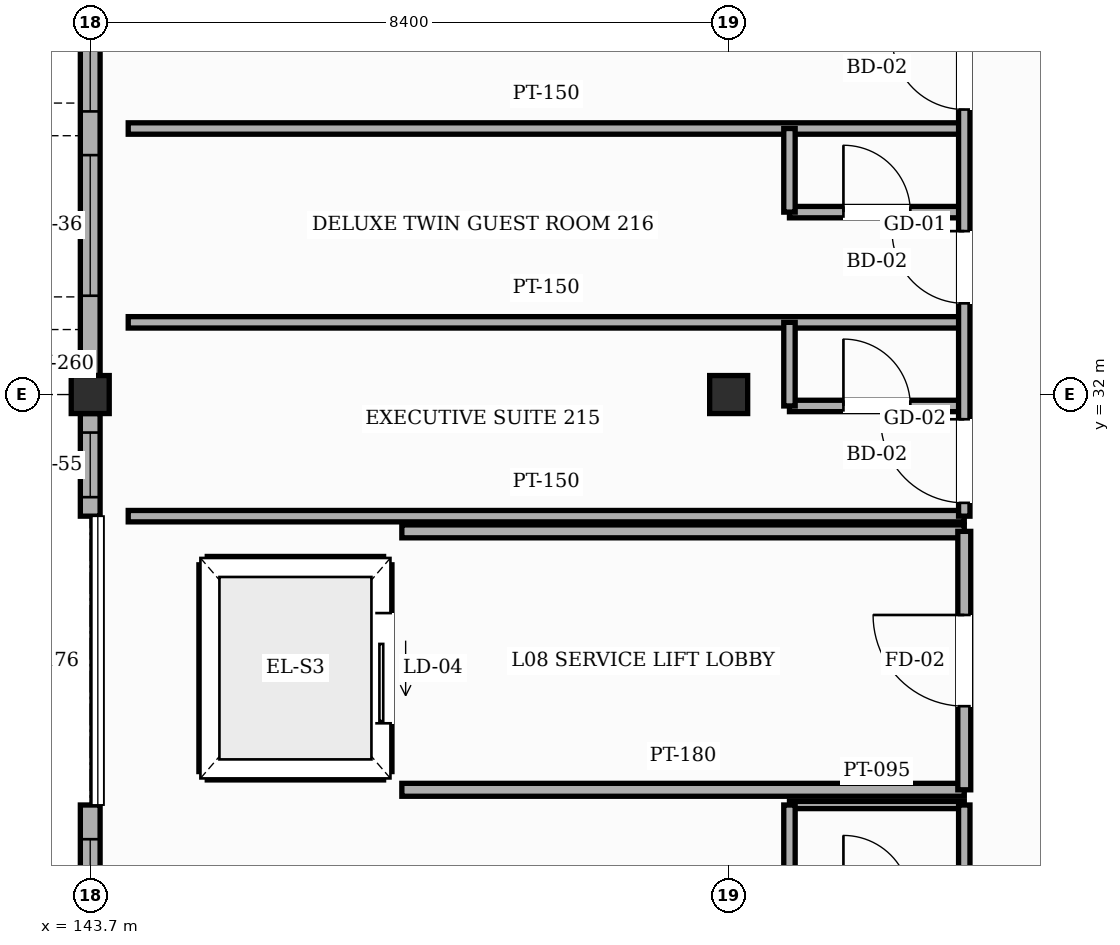
"""IFC4 building model, lengths in metres.
Left out: names, types, materials, properties, quantities, classifications, styles, units other than length and angle.
Written with IfcOpenShell. Run it as: python <this file> out.ifc"""

import sys

from ifc_helpers import new_model, si_unit, direction, frame, frame_2d, origin, origin_2d, place, context, subcontext, project, spatial, rectangle, hollow_rectangle, extrude, element, fill, save


model = new_model("IFC4")
c1 = context("Model", 3, precision=1e-05, world=origin(), true_north=direction((0.0, 1.0)))
c2 = subcontext(c1, "Body", "Model", "MODEL_VIEW")
j1 = project(units=[si_unit("LENGTHUNIT", "METRE"), si_unit("PLANEANGLEUNIT", "RADIAN")], contexts=[c1])
p1 = place(None, origin())
s1 = spatial("IfcSite", under=j1, at=p1, CompositionType="ELEMENT")
p2 = place(p1, origin())
s2 = spatial("IfcBuilding", under=s1, at=p2, CompositionType="ELEMENT")
p3 = place(p2, frame((0.0, 0.0, 35.4)))
s3 = spatial("IfcBuildingStorey", under=s2, at=p3, CompositionType="ELEMENT", Elevation=35.4)
for number, where, z_axis, x_axis in (
    (1, (143.7, 32.0, 0.0), (0.0, 0.0, 1.0), (1.0, 0.0, 0.0)),
    (2, (152.1, 32.0, 0.0), (0.0, 0.0, 1.0), (1.0, 0.0, 0.0)),
):
    element("IfcColumn", number, at=place(p3, frame(where, z_axis=z_axis, x_axis=x_axis)), inside=s3, PredefinedType="COLUMN", context=c2, shape_type="SweptSolid", body=[
        extrude(hollow_rectangle(XDim=0.5, YDim=0.5, WallThickness=0.022, InnerFilletRadius=0.022, OuterFilletRadius=0.044, at=origin_2d()), origin(), (0.0, 0.0, 1.0), 3.6),
    ])
p4 = place(p3, frame((143.7, 24.25, 0.0), z_axis=(0.0, 0.0, 1.0), x_axis=(0.0, 1.0, 0.0)))
e3 = element("IfcWall", 3, at=p4, inside=s3, PredefinedType="SOLIDWALL", context=c2, shape_type="SweptSolid", body=[
    extrude(rectangle(XDim=2.35, YDim=0.26, at=frame_2d((1.175, 0.0))), origin(), (0.0, 0.0, 1.0), 2.805),
])
p5 = place(p4, frame((0.45, 0.0, 0.85)))
e4 = element("IfcOpeningElement", 4, at=p5, cuts=e3, PredefinedType="OPENING", context=c2, shape_type="SweptSolid", body=[
    extrude(rectangle(XDim=1.45, YDim=1.35, at=frame_2d((0.725, 0.675))), frame((0.0, 0.14, 0.0), z_axis=(0.0, -1.0, 0.0), x_axis=(1.0, 0.0, 0.0)), (0.0, 0.0, 1.0), 0.28),
])
p6 = place(p3, frame((143.7, 30.4, 0.0), z_axis=(0.0, 0.0, 1.0), x_axis=(0.0, 1.0, 0.0)))
e5 = element("IfcWall", 5, at=p6, inside=s3, PredefinedType="SOLIDWALL", context=c2, shape_type="SweptSolid", body=[
    extrude(rectangle(XDim=1.35, YDim=0.26, at=frame_2d((0.675, 0.0))), origin(), (0.0, 0.0, 1.0), 2.805),
])
p7 = place(p6, frame((0.25, 0.0, 0.85)))
e6 = element("IfcOpeningElement", 6, at=p7, cuts=e5, PredefinedType="OPENING", context=c2, shape_type="SweptSolid", body=[
    extrude(rectangle(XDim=0.85, YDim=1.35, at=frame_2d((0.425, 0.675))), frame((0.0, 0.14, 0.0), z_axis=(0.0, -1.0, 0.0), x_axis=(1.0, 0.0, 0.0)), (0.0, 0.0, 1.0), 0.28),
])
p8 = place(p3, frame((143.7, 32.25, 0.0), z_axis=(0.0, 0.0, 1.0), x_axis=(0.0, 1.0, 0.0)))
e7 = element("IfcWall", 7, at=p8, inside=s3, PredefinedType="SOLIDWALL", context=c2, shape_type="SweptSolid", body=[
    extrude(rectangle(XDim=8.4, YDim=0.26, at=frame_2d((4.2, 0.0))), origin(), (0.0, 0.0, 1.0), 2.655),
])
p9 = place(p8, frame((1.05, 0.0, 0.85)))
e8 = element("IfcOpeningElement", 8, at=p9, cuts=e7, PredefinedType="OPENING", context=c2, shape_type="SweptSolid", body=[
    extrude(rectangle(XDim=1.85, YDim=1.35, at=frame_2d((0.925, 0.675))), frame((0.0, 0.14, 0.0), z_axis=(0.0, -1.0, 0.0), x_axis=(1.0, 0.0, 0.0)), (0.0, 0.0, 1.0), 0.28),
])
p10 = place(p8, frame((3.475, 0.0, 0.85)))
e9 = element("IfcOpeningElement", 9, at=p10, cuts=e7, PredefinedType="OPENING", context=c2, shape_type="SweptSolid", body=[
    extrude(rectangle(XDim=2.1, YDim=1.35, at=frame_2d((1.05, 0.675))), frame((0.0, 0.14, 0.0), z_axis=(0.0, -1.0, 0.0), x_axis=(1.0, 0.0, 0.0)), (0.0, 0.0, 1.0), 0.28),
])
p11 = place(p8, frame((6.5, 0.0, 0.85)))
e10 = element("IfcOpeningElement", 10, at=p11, cuts=e7, PredefinedType="OPENING", context=c2, shape_type="SweptSolid", body=[
    extrude(rectangle(XDim=1.15, YDim=1.35, at=frame_2d((0.575, 0.675))), frame((0.0, 0.14, 0.0), z_axis=(0.0, -1.0, 0.0), x_axis=(1.0, 0.0, 0.0)), (0.0, 0.0, 1.0), 0.28),
])
for number, where, z_axis, x_axis in (
    (11, (145.24, 29.76, 0.0), (0.0, 0.0, 1.0), (1.0, 0.0, 0.0)),
    (12, (145.24, 27.04, 0.0), (0.0, 0.0, 1.0), (1.0, 0.0, 0.0)),
):
    element("IfcWall", number, at=place(p3, frame(where, z_axis=z_axis, x_axis=x_axis)), inside=s3, PredefinedType="SHEAR", context=c2, shape_type="SweptSolid", body=[
        extrude(rectangle(XDim=2.32, YDim=0.22, at=frame_2d((1.16, 0.0))), origin(), (0.0, 0.0, 1.0), 3.38),
    ])
p12 = place(p3, frame((147.56, 27.04, 0.0), z_axis=(0.0, 0.0, 1.0), x_axis=(0.0, 1.0, 0.0)))
e13 = element("IfcWall", 13, at=p12, inside=s3, PredefinedType="SHEAR", context=c2, shape_type="SweptSolid", body=[
    extrude(rectangle(XDim=2.72, YDim=0.22, at=frame_2d((1.36, 0.0))), origin(), (0.0, 0.0, 1.0), 3.38),
])
p13 = place(p12, frame((0.635, 0.0, 0.0)))
e14 = element("IfcOpeningElement", 14, at=p13, cuts=e13, PredefinedType="OPENING", context=c2, shape_type="SweptSolid", body=[
    extrude(rectangle(XDim=1.45, YDim=2.35, at=frame_2d((0.725, 1.175))), frame((0.0, 0.12, 0.0), z_axis=(0.0, -1.0, 0.0), x_axis=(1.0, 0.0, 0.0)), (0.0, 0.0, 1.0), 0.24),
])
p14 = place(p3, frame((145.24, 27.04, 0.0), z_axis=(0.0, 0.0, 1.0), x_axis=(0.0, 1.0, 0.0)))
e15 = element("IfcWall", 15, at=p14, inside=s3, PredefinedType="SHEAR", context=c2, shape_type="SweptSolid", body=[
    extrude(rectangle(XDim=2.72, YDim=0.22, at=frame_2d((1.36, 0.0))), origin(), (0.0, 0.0, 1.0), 3.38),
])
p15 = place(p3, frame((152.9, 26.6, 0.0), z_axis=(0.0, 0.0, 1.0), x_axis=(1.0, 0.0, 0.0)))
e16 = element("IfcWall", 16, at=p15, inside=s3, PredefinedType="PARTITIONING", context=c2, shape_type="SweptSolid", body=[
    extrude(rectangle(XDim=2.3, YDim=0.095, at=frame_2d((1.15, 0.0))), origin(), (0.0, 0.0, 1.0), 3.365),
])
for number, where, z_axis, x_axis in (
    (17, (147.8, 26.8, 0.0), (0.0, 0.0, 1.0), (1.0, 0.0, 0.0)),
    (18, (147.8, 30.2, 0.0), (0.0, 0.0, 1.0), (1.0, 0.0, 0.0)),
):
    element("IfcWall", number, at=place(p3, frame(where, z_axis=z_axis, x_axis=x_axis)), inside=s3, PredefinedType="PARTITIONING", context=c2, shape_type="SweptSolid", body=[
        extrude(rectangle(XDim=7.4, YDim=0.17, at=frame_2d((3.7, 0.0))), origin(), (0.0, 0.0, 1.0), 3.365),
    ])
p16 = place(p3, frame((144.2, 30.4, 0.0), z_axis=(0.0, 0.0, 1.0), x_axis=(1.0, 0.0, 0.0)))
e19 = element("IfcWall", 19, at=p16, inside=s3, PredefinedType="PARTITIONING", context=c2, shape_type="SweptSolid", body=[
    extrude(rectangle(XDim=11.0, YDim=0.15, at=frame_2d((5.5, 0.0))), origin(), (0.0, 0.0, 1.0), 3.365),
])
p17 = place(p3, frame((152.9, 31.85, 0.0), z_axis=(0.0, 0.0, 1.0), x_axis=(1.0, 0.0, 0.0)))
e20 = element("IfcWall", 20, at=p17, inside=s3, PredefinedType="PARTITIONING", context=c2, shape_type="SweptSolid", body=[
    extrude(rectangle(XDim=2.3, YDim=0.15, at=frame_2d((1.15, 0.0))), origin(), (0.0, 0.0, 1.0), 2.755),
])
p18 = place(p17, frame((0.71, 0.0, 0.0)))
e21 = element("IfcOpeningElement", 21, at=p18, cuts=e20, PredefinedType="OPENING", context=c2, shape_type="SweptSolid", body=[
    extrude(rectangle(XDim=0.88, YDim=2.12, at=frame_2d((0.44, 1.06))), frame((0.0, 0.085, 0.0), z_axis=(0.0, -1.0, 0.0), x_axis=(1.0, 0.0, 0.0)), (0.0, 0.0, 1.0), 0.17),
])
p19 = place(p3, frame((144.2, 32.95, 0.0), z_axis=(0.0, 0.0, 1.0), x_axis=(1.0, 0.0, 0.0)))
e22 = element("IfcWall", 22, at=p19, inside=s3, PredefinedType="PARTITIONING", context=c2, shape_type="SweptSolid", body=[
    extrude(rectangle(XDim=11.0, YDim=0.15, at=frame_2d((5.5, 0.0))), origin(), (0.0, 0.0, 1.0), 3.365),
])
p20 = place(p3, frame((152.9, 34.4, 0.0), z_axis=(0.0, 0.0, 1.0), x_axis=(1.0, 0.0, 0.0)))
e23 = element("IfcWall", 23, at=p20, inside=s3, PredefinedType="PARTITIONING", context=c2, shape_type="SweptSolid", body=[
    extrude(rectangle(XDim=2.3, YDim=0.15, at=frame_2d((1.15, 0.0))), origin(), (0.0, 0.0, 1.0), 3.365),
])
p21 = place(p20, frame((0.71, 0.0, 0.0)))
e24 = element("IfcOpeningElement", 24, at=p21, cuts=e23, PredefinedType="OPENING", context=c2, shape_type="SweptSolid", body=[
    extrude(rectangle(XDim=0.88, YDim=2.12, at=frame_2d((0.44, 1.06))), frame((0.0, 0.085, 0.0), z_axis=(0.0, -1.0, 0.0), x_axis=(1.0, 0.0, 0.0)), (0.0, 0.0, 1.0), 0.17),
])
p22 = place(p3, frame((144.2, 35.5, 0.0), z_axis=(0.0, 0.0, 1.0), x_axis=(1.0, 0.0, 0.0)))
e25 = element("IfcWall", 25, at=p22, inside=s3, PredefinedType="PARTITIONING", context=c2, shape_type="SweptSolid", body=[
    extrude(rectangle(XDim=11.0, YDim=0.15, at=frame_2d((5.5, 0.0))), origin(), (0.0, 0.0, 1.0), 3.365),
])
p23 = place(p3, frame((152.9, 25.315, 0.0), z_axis=(0.0, 0.0, 1.0), x_axis=(0.0, 1.0, 0.0)))
e26 = element("IfcWall", 26, at=p23, inside=s3, PredefinedType="PARTITIONING", context=c2, shape_type="SweptSolid", body=[
    extrude(rectangle(XDim=1.285, YDim=0.15, at=frame_2d((0.643, 0.0))), origin(), (0.0, 0.0, 1.0), 3.365),
])
p24 = place(p3, frame((152.9, 31.85, 0.0), z_axis=(0.0, 0.0, 1.0), x_axis=(0.0, 1.0, 0.0)))
e27 = element("IfcWall", 27, at=p24, inside=s3, PredefinedType="PARTITIONING", context=c2, shape_type="SweptSolid", body=[
    extrude(rectangle(XDim=1.1, YDim=0.15, at=frame_2d((0.55, 0.0))), origin(), (0.0, 0.0, 1.0), 3.365),
])
p25 = place(p3, frame((152.9, 34.4, 0.0), z_axis=(0.0, 0.0, 1.0), x_axis=(0.0, 1.0, 0.0)))
e28 = element("IfcWall", 28, at=p25, inside=s3, PredefinedType="PARTITIONING", context=c2, shape_type="SweptSolid", body=[
    extrude(rectangle(XDim=1.1, YDim=0.15, at=frame_2d((0.55, 0.0))), origin(), (0.0, 0.0, 1.0), 3.365),
])
p26 = place(p3, frame((155.2, 8.4, 0.0), z_axis=(0.0, 0.0, 1.0), x_axis=(0.0, 1.0, 0.0)))
e29 = element("IfcWall", 29, at=p26, inside=s3, PredefinedType="PARTITIONING", context=c2, shape_type="SweptSolid", body=[
    extrude(rectangle(XDim=18.2, YDim=0.15, at=frame_2d((9.1, 0.0))), origin(), (0.0, 0.0, 1.0), 3.365),
])
p27 = place(p26, frame((0.325, 0.0, 0.0)))
e30 = element("IfcOpeningElement", 30, at=p27, cuts=e29, PredefinedType="OPENING", context=c2, shape_type="SweptSolid", body=[
    extrude(rectangle(XDim=1.1, YDim=2.2, at=frame_2d((0.55, 1.1))), frame((0.0, 0.085, 0.0), z_axis=(0.0, -1.0, 0.0), x_axis=(1.0, 0.0, 0.0)), (0.0, 0.0, 1.0), 0.17),
])
p28 = place(p26, frame((3.435, 0.0, 0.0)))
e31 = element("IfcOpeningElement", 31, at=p28, cuts=e29, PredefinedType="OPENING", context=c2, shape_type="SweptSolid", body=[
    extrude(rectangle(XDim=0.95, YDim=2.15, at=frame_2d((0.475, 1.075))), frame((0.0, 0.085, 0.0), z_axis=(0.0, -1.0, 0.0), x_axis=(1.0, 0.0, 0.0)), (0.0, 0.0, 1.0), 0.17),
])
p29 = place(p26, frame((6.465, 0.0, 0.0)))
e32 = element("IfcOpeningElement", 32, at=p29, cuts=e29, PredefinedType="OPENING", context=c2, shape_type="SweptSolid", body=[
    extrude(rectangle(XDim=0.95, YDim=2.15, at=frame_2d((0.475, 1.075))), frame((0.0, 0.085, 0.0), z_axis=(0.0, -1.0, 0.0), x_axis=(1.0, 0.0, 0.0)), (0.0, 0.0, 1.0), 0.17),
])
p30 = place(p26, frame((9.5, 0.0, 0.0)))
e33 = element("IfcOpeningElement", 33, at=p30, cuts=e29, PredefinedType="OPENING", context=c2, shape_type="SweptSolid", body=[
    extrude(rectangle(XDim=0.95, YDim=2.15, at=frame_2d((0.475, 1.075))), frame((0.0, 0.085, 0.0), z_axis=(0.0, -1.0, 0.0), x_axis=(1.0, 0.0, 0.0)), (0.0, 0.0, 1.0), 0.17),
])
p31 = place(p26, frame((12.535, 0.0, 0.0)))
e34 = element("IfcOpeningElement", 34, at=p31, cuts=e29, PredefinedType="OPENING", context=c2, shape_type="SweptSolid", body=[
    extrude(rectangle(XDim=0.95, YDim=2.15, at=frame_2d((0.475, 1.075))), frame((0.0, 0.085, 0.0), z_axis=(0.0, -1.0, 0.0), x_axis=(1.0, 0.0, 0.0)), (0.0, 0.0, 1.0), 0.17),
])
p32 = place(p26, frame((15.565, 0.0, 0.0)))
e35 = element("IfcOpeningElement", 35, at=p32, cuts=e29, PredefinedType="OPENING", context=c2, shape_type="SweptSolid", body=[
    extrude(rectangle(XDim=0.95, YDim=2.15, at=frame_2d((0.475, 1.075))), frame((0.0, 0.085, 0.0), z_axis=(0.0, -1.0, 0.0), x_axis=(1.0, 0.0, 0.0)), (0.0, 0.0, 1.0), 0.17),
])
p33 = place(p3, frame((155.2, 26.8, 0.0), z_axis=(0.0, 0.0, 1.0), x_axis=(0.0, 1.0, 0.0)))
e36 = element("IfcWall", 36, at=p33, inside=s3, PredefinedType="PARTITIONING", context=c2, shape_type="SweptSolid", body=[
    extrude(rectangle(XDim=3.4, YDim=0.17, at=frame_2d((1.7, 0.0))), origin(), (0.0, 0.0, 1.0), 3.365),
])
p34 = place(p33, frame((1.1, 0.0, 0.0)))
e37 = element("IfcOpeningElement", 37, at=p34, cuts=e36, PredefinedType="OPENING", context=c2, shape_type="SweptSolid", body=[
    extrude(rectangle(XDim=1.2, YDim=2.2, at=frame_2d((0.6, 1.1))), frame((0.0, 0.095, 0.0), z_axis=(0.0, -1.0, 0.0), x_axis=(1.0, 0.0, 0.0)), (0.0, 0.0, 1.0), 0.19),
])
p35 = place(p3, frame((155.2, 30.4, 0.0), z_axis=(0.0, 0.0, 1.0), x_axis=(0.0, 1.0, 0.0)))
e38 = element("IfcWall", 38, at=p35, inside=s3, PredefinedType="PARTITIONING", context=c2, shape_type="SweptSolid", body=[
    extrude(rectangle(XDim=10.2, YDim=0.15, at=frame_2d((5.1, 0.0))), origin(), (0.0, 0.0, 1.0), 3.365),
])
p36 = place(p35, frame((0.175, 0.0, 0.0)))
e39 = element("IfcOpeningElement", 39, at=p36, cuts=e38, PredefinedType="OPENING", context=c2, shape_type="SweptSolid", body=[
    extrude(rectangle(XDim=1.1, YDim=2.2, at=frame_2d((0.55, 1.1))), frame((0.0, 0.085, 0.0), z_axis=(0.0, -1.0, 0.0), x_axis=(1.0, 0.0, 0.0)), (0.0, 0.0, 1.0), 0.17),
])
p37 = place(p35, frame((2.8, 0.0, 0.0)))
e40 = element("IfcOpeningElement", 40, at=p37, cuts=e38, PredefinedType="OPENING", context=c2, shape_type="SweptSolid", body=[
    extrude(rectangle(XDim=0.95, YDim=2.15, at=frame_2d((0.475, 1.075))), frame((0.0, 0.085, 0.0), z_axis=(0.0, -1.0, 0.0), x_axis=(1.0, 0.0, 0.0)), (0.0, 0.0, 1.0), 0.17),
])
p38 = place(p35, frame((5.35, 0.0, 0.0)))
e41 = element("IfcOpeningElement", 41, at=p38, cuts=e38, PredefinedType="OPENING", context=c2, shape_type="SweptSolid", body=[
    extrude(rectangle(XDim=0.95, YDim=2.15, at=frame_2d((0.475, 1.075))), frame((0.0, 0.085, 0.0), z_axis=(0.0, -1.0, 0.0), x_axis=(1.0, 0.0, 0.0)), (0.0, 0.0, 1.0), 0.17),
])
p39 = place(p35, frame((7.9, 0.0, 0.0)))
e42 = element("IfcOpeningElement", 42, at=p39, cuts=e38, PredefinedType="OPENING", context=c2, shape_type="SweptSolid", body=[
    extrude(rectangle(XDim=0.95, YDim=2.15, at=frame_2d((0.475, 1.075))), frame((0.0, 0.085, 0.0), z_axis=(0.0, -1.0, 0.0), x_axis=(1.0, 0.0, 0.0)), (0.0, 0.0, 1.0), 0.17),
])
p40 = place(p5, origin())
e43 = element("IfcWindow", 43, at=p40, inside=s3, PartitioningType="SINGLE_PANEL", PredefinedType="WINDOW", context=c2, shape_type="SweptSolid", body=[
    extrude(rectangle(XDim=1.45, YDim=1.35, at=frame_2d((0.725, 0.675))), frame((0.0, 0.03, 0.0), z_axis=(0.0, -1.0, 0.0), x_axis=(1.0, 0.0, 0.0)), (0.0, 0.0, 1.0), 0.06),
])
fill(e4, e43)
p41 = place(p7, origin())
e44 = element("IfcWindow", 44, at=p41, inside=s3, PartitioningType="SINGLE_PANEL", PredefinedType="WINDOW", context=c2, shape_type="SweptSolid", body=[
    extrude(rectangle(XDim=0.85, YDim=1.35, at=frame_2d((0.425, 0.675))), frame((0.0, 0.03, 0.0), z_axis=(0.0, -1.0, 0.0), x_axis=(1.0, 0.0, 0.0)), (0.0, 0.0, 1.0), 0.06),
])
fill(e6, e44)
p42 = place(p9, origin())
e45 = element("IfcWindow", 45, at=p42, inside=s3, PartitioningType="SINGLE_PANEL", PredefinedType="WINDOW", context=c2, shape_type="SweptSolid", body=[
    extrude(rectangle(XDim=1.85, YDim=1.35, at=frame_2d((0.925, 0.675))), frame((0.0, 0.03, 0.0), z_axis=(0.0, -1.0, 0.0), x_axis=(1.0, 0.0, 0.0)), (0.0, 0.0, 1.0), 0.06),
])
fill(e8, e45)
p43 = place(p10, origin())
e46 = element("IfcWindow", 46, at=p43, inside=s3, PartitioningType="SINGLE_PANEL", PredefinedType="WINDOW", context=c2, shape_type="SweptSolid", body=[
    extrude(rectangle(XDim=2.1, YDim=1.35, at=frame_2d((1.05, 0.675))), frame((0.0, 0.03, 0.0), z_axis=(0.0, -1.0, 0.0), x_axis=(1.0, 0.0, 0.0)), (0.0, 0.0, 1.0), 0.06),
])
fill(e9, e46)
p44 = place(p13, origin())
e47 = element("IfcDoor", 47, at=p44, inside=s3, OperationType="SLIDING_TO_LEFT", PredefinedType="DOOR", context=c2, shape_type="SweptSolid", body=[
    extrude(rectangle(XDim=1.45, YDim=2.35, at=frame_2d((0.725, 1.175))), frame((0.0, 0.025, 0.0), z_axis=(0.0, -1.0, 0.0), x_axis=(1.0, 0.0, 0.0)), (0.0, 0.0, 1.0), 0.05),
])
fill(e14, e47)
p45 = place(p34, origin())
e48 = element("IfcDoor", 48, at=p45, inside=s3, OperationType="SINGLE_SWING_RIGHT", PredefinedType="DOOR", context=c2, shape_type="SweptSolid", body=[
    extrude(rectangle(XDim=1.2, YDim=2.2, at=frame_2d((0.6, 1.1))), frame((0.0, 0.025, 0.0), z_axis=(0.0, -1.0, 0.0), x_axis=(1.0, 0.0, 0.0)), (0.0, 0.0, 1.0), 0.05),
])
fill(e37, e48)
p46 = place(p36, origin())
e49 = element("IfcDoor", 49, at=p46, inside=s3, OperationType="SINGLE_SWING_RIGHT", PredefinedType="DOOR", context=c2, shape_type="SweptSolid", body=[
    extrude(rectangle(XDim=1.1, YDim=2.2, at=frame_2d((0.55, 1.1))), frame((0.0, 0.025, 0.0), z_axis=(0.0, -1.0, 0.0), x_axis=(1.0, 0.0, 0.0)), (0.0, 0.0, 1.0), 0.05),
])
fill(e39, e49)
p47 = place(p18, origin())
e50 = element("IfcDoor", 50, at=p47, inside=s3, OperationType="SINGLE_SWING_LEFT", PredefinedType="DOOR", context=c2, shape_type="SweptSolid", body=[
    extrude(rectangle(XDim=0.88, YDim=2.12, at=frame_2d((0.44, 1.06))), frame((0.0, 0.025, 0.0), z_axis=(0.0, -1.0, 0.0), x_axis=(1.0, 0.0, 0.0)), (0.0, 0.0, 1.0), 0.05),
])
fill(e21, e50)
p48 = place(p37, origin())
e51 = element("IfcDoor", 51, at=p48, inside=s3, OperationType="SINGLE_SWING_RIGHT", PredefinedType="DOOR", context=c2, shape_type="SweptSolid", body=[
    extrude(rectangle(XDim=0.95, YDim=2.15, at=frame_2d((0.475, 1.075))), frame((0.0, 0.025, 0.0), z_axis=(0.0, -1.0, 0.0), x_axis=(1.0, 0.0, 0.0)), (0.0, 0.0, 1.0), 0.05),
])
fill(e40, e51)
p49 = place(p21, origin())
e52 = element("IfcDoor", 52, at=p49, inside=s3, OperationType="SINGLE_SWING_LEFT", PredefinedType="DOOR", context=c2, shape_type="SweptSolid", body=[
    extrude(rectangle(XDim=0.88, YDim=2.12, at=frame_2d((0.44, 1.06))), frame((0.0, 0.025, 0.0), z_axis=(0.0, -1.0, 0.0), x_axis=(1.0, 0.0, 0.0)), (0.0, 0.0, 1.0), 0.05),
])
fill(e24, e52)
p50 = place(p38, origin())
e53 = element("IfcDoor", 53, at=p50, inside=s3, OperationType="SINGLE_SWING_RIGHT", PredefinedType="DOOR", context=c2, shape_type="SweptSolid", body=[
    extrude(rectangle(XDim=0.95, YDim=2.15, at=frame_2d((0.475, 1.075))), frame((0.0, 0.025, 0.0), z_axis=(0.0, -1.0, 0.0), x_axis=(1.0, 0.0, 0.0)), (0.0, 0.0, 1.0), 0.05),
])
fill(e41, e53)
save(model, sys.argv[1])
